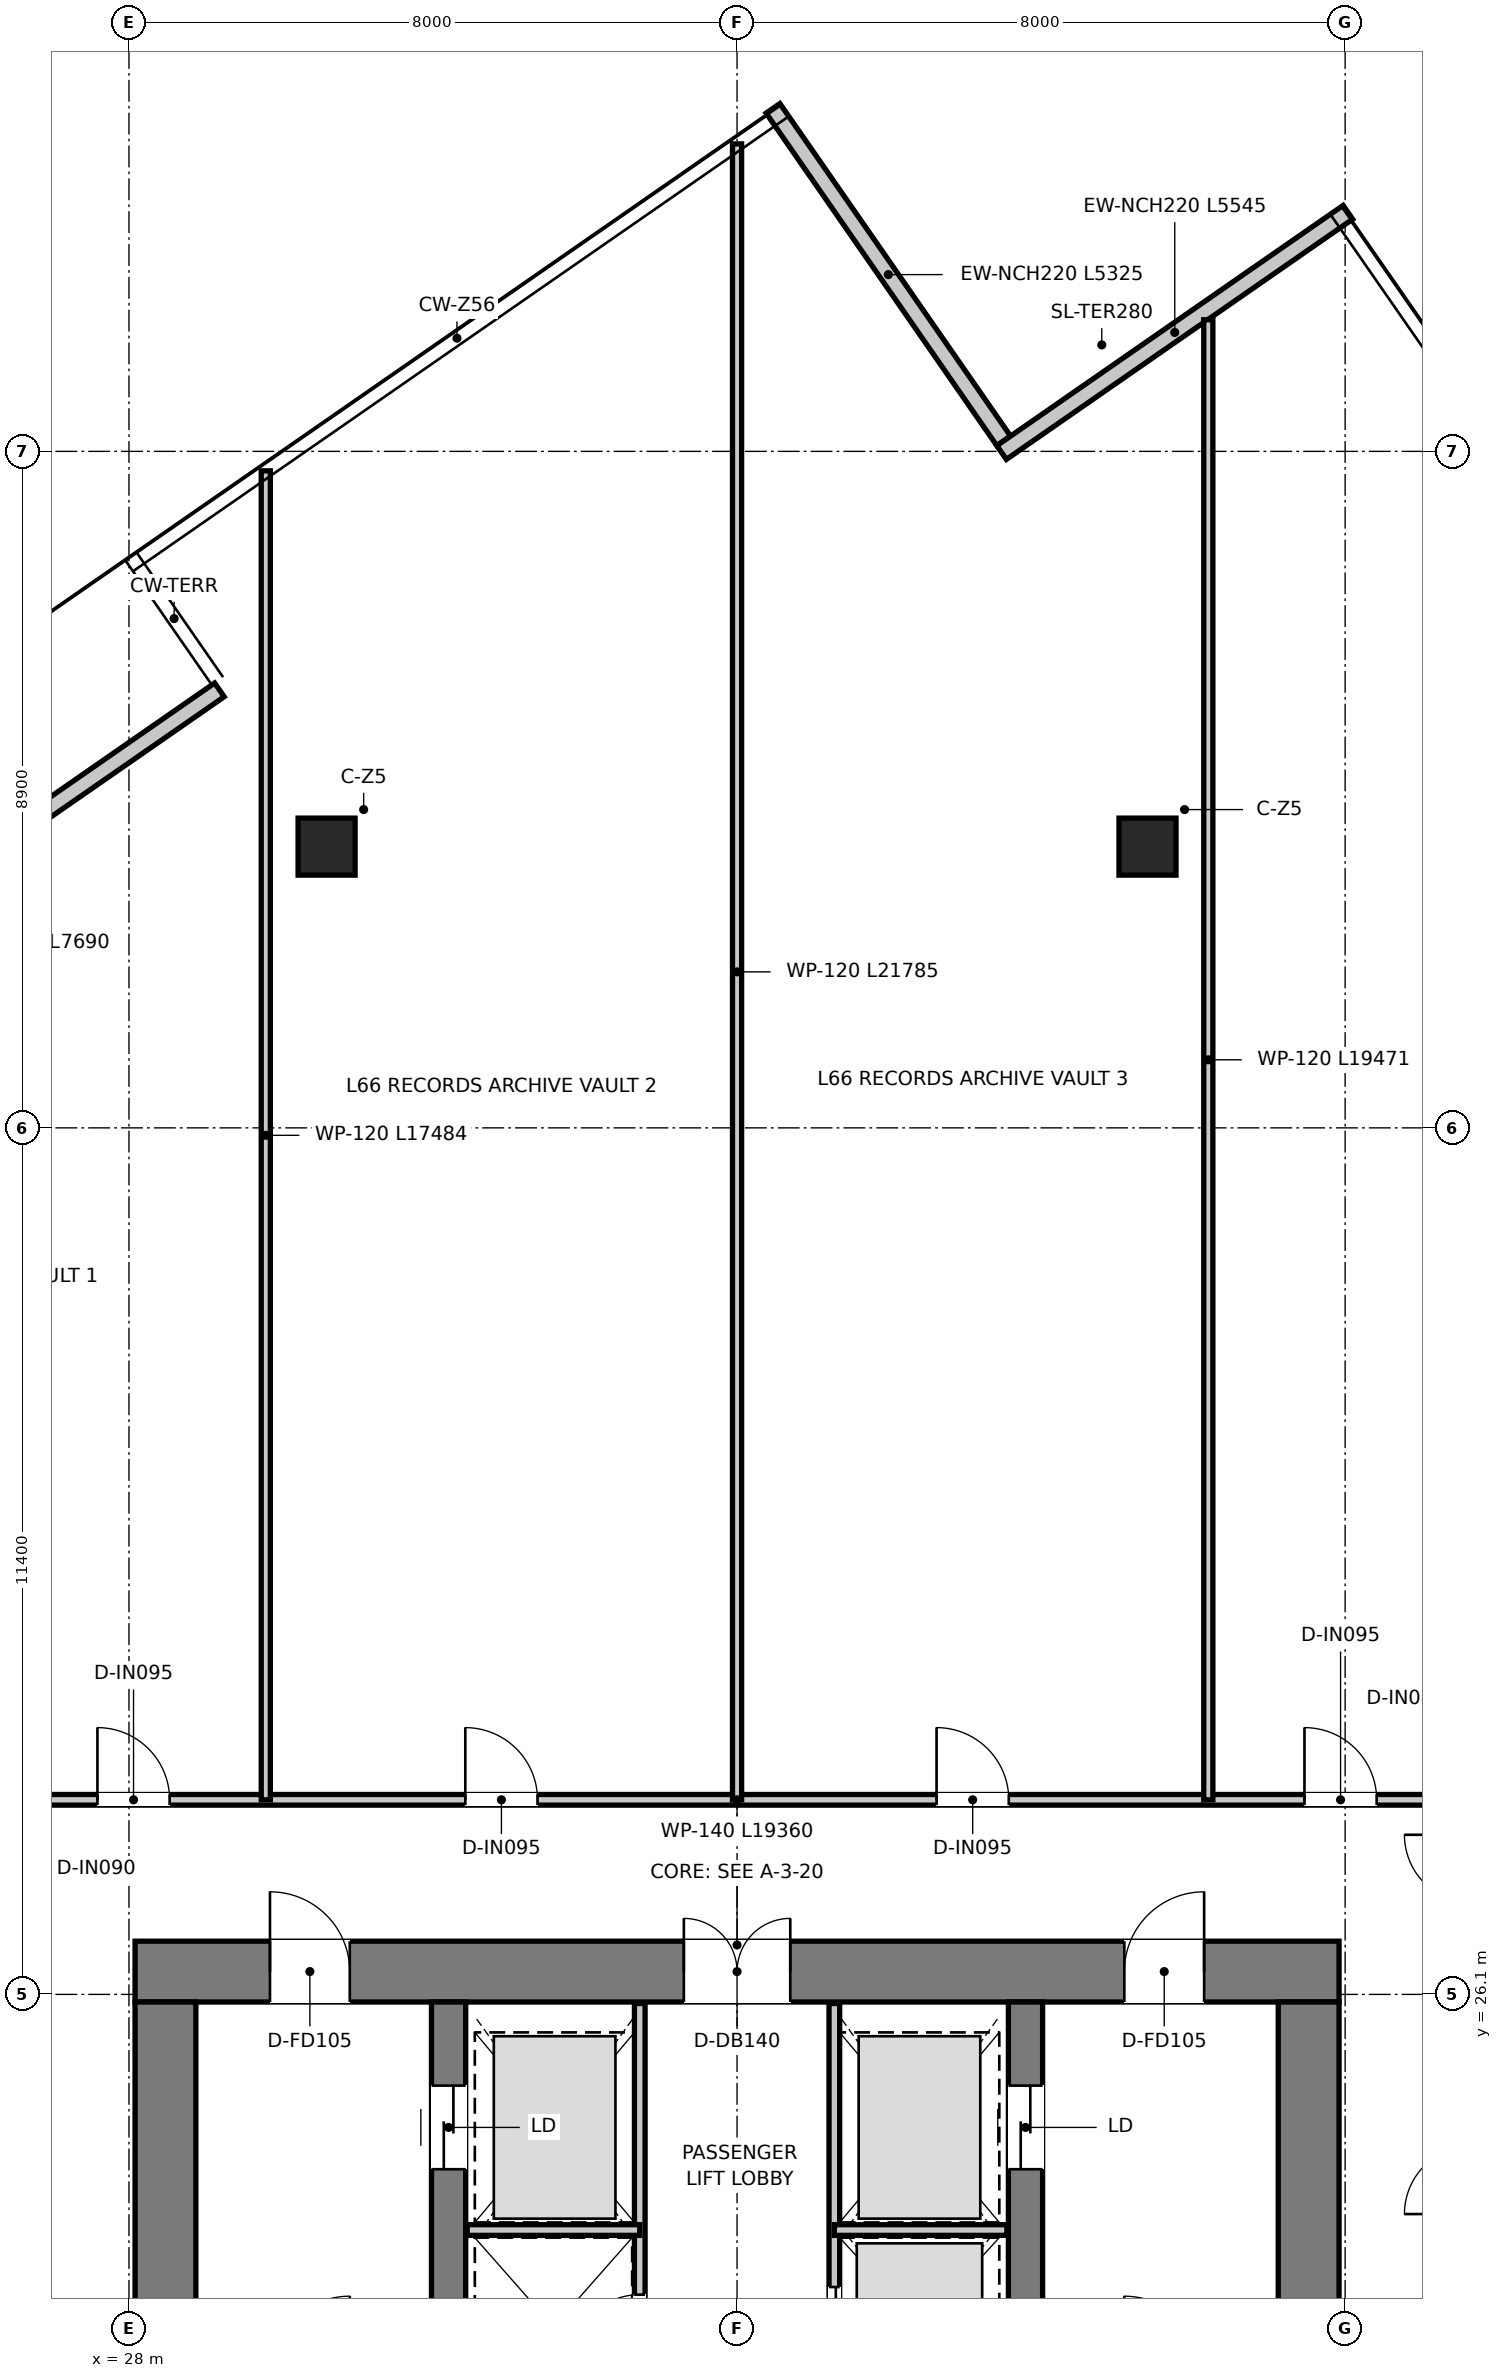
"""IFC4 building model, lengths in metres.
Left out: names, types, materials, properties, quantities, classifications, styles, units other than length and angle.
Written with IfcOpenShell. Run it as: python <this file> out.ifc"""

import sys

from ifc_helpers import new_model, si_unit, direction, frame, frame_2d, origin, origin_2d, place, context, subcontext, project, spatial, rectangle, extrude, source, transform, mapped, element, fill, save


model = new_model("IFC4")
c1 = context("Model", 3, precision=1e-05, world=origin(), true_north=direction((0.0, 1.0)))
c2 = subcontext(c1, "Body", "Model", "MODEL_VIEW")
j1 = project(units=[si_unit("LENGTHUNIT", "METRE"), si_unit("PLANEANGLEUNIT", "RADIAN")], contexts=[c1])
p1 = place(None, origin())
s1 = spatial("IfcSite", under=j1, at=p1, CompositionType="ELEMENT")
p2 = place(p1, origin())
s2 = spatial("IfcBuilding", under=s1, at=p2, CompositionType="ELEMENT")
p3 = place(p2, frame((0.0, 0.0, 271.35)))
s3 = spatial("IfcBuildingStorey", under=s2, at=p3, CompositionType="ELEMENT", Elevation=271.35)
p4 = place(p3, frame((28.08, 26.4, 0.0), z_axis=(0.0, 0.0, 1.0), x_axis=(1.0, 0.0, 0.0)))
e1 = element("IfcWall", 1, at=p4, inside=s3, PredefinedType="SHEAR", context=c2, shape_type="SweptSolid", body=[
    extrude(rectangle(XDim=15.84, YDim=0.8, at=frame_2d((7.92, 0.0))), origin(), (0.0, 0.0, 1.0), 3.95),
])
p5 = place(p4, frame((7.22, 0.0, 0.0)))
e2 = element("IfcOpeningElement", 2, at=p5, cuts=e1, PredefinedType="OPENING", context=c2, shape_type="SweptSolid", body=[
    extrude(rectangle(XDim=1.4, YDim=2.2, at=frame_2d((0.7, 1.1))), frame((0.0, 0.41, 0.0), z_axis=(0.0, -1.0, 0.0), x_axis=(1.0, 0.0, 0.0)), (0.0, 0.0, 1.0), 0.82),
])
p6 = place(p4, frame((1.775, 0.0, 0.0)))
e3 = element("IfcOpeningElement", 3, at=p6, cuts=e1, PredefinedType="OPENING", context=c2, shape_type="SweptSolid", body=[
    extrude(rectangle(XDim=1.05, YDim=2.1, at=frame_2d((0.525, 1.05))), frame((0.0, 0.41, 0.0), z_axis=(0.0, -1.0, 0.0), x_axis=(1.0, 0.0, 0.0)), (0.0, 0.0, 1.0), 0.82),
])
p7 = place(p4, frame((13.015, 0.0, 0.0)))
e4 = element("IfcOpeningElement", 4, at=p7, cuts=e1, PredefinedType="OPENING", context=c2, shape_type="SweptSolid", body=[
    extrude(rectangle(XDim=1.05, YDim=2.1, at=frame_2d((0.525, 1.05))), frame((0.0, 0.41, 0.0), z_axis=(0.0, -1.0, 0.0), x_axis=(1.0, 0.0, 0.0)), (0.0, 0.0, 1.0), 0.82),
])
for number, where, z_axis, x_axis in (
    (5, (28.48, 11.3, 0.0), (0.0, 0.0, 1.0), (0.0, 1.0, 0.0)),
    (6, (43.52, 11.3, 0.0), (0.0, 0.0, 1.0), (0.0, 1.0, 0.0)),
):
    element("IfcWall", number, at=place(p3, frame(where, z_axis=z_axis, x_axis=x_axis)), inside=s3, PredefinedType="SHEAR", context=c2, shape_type="SweptSolid", body=[
        extrude(rectangle(XDim=14.7, YDim=0.8, at=frame_2d((7.35, 0.0))), origin(), (0.0, 0.0, 1.0), 3.95),
    ])
p8 = place(p3, frame((32.205, 13.22, 0.0), z_axis=(0.0, 0.0, 1.0), x_axis=(0.0, 1.0, 0.0)))
e7 = element("IfcWall", 7, at=p8, inside=s3, PredefinedType="SHEAR", context=c2, shape_type="SweptSolid", body=[
    extrude(rectangle(XDim=12.78, YDim=0.45, at=frame_2d((6.39, 0.0))), origin(), (0.0, 0.0, 1.0), 3.95),
])
p9 = place(p8, frame((10.58, 0.0, 0.0)))
e8 = element("IfcOpeningElement", 8, at=p9, cuts=e7, PredefinedType="OPENING", context=c2, shape_type="SweptSolid", body=[
    extrude(rectangle(XDim=1.1, YDim=2.15, at=frame_2d((0.55, 1.075))), frame((0.0, 0.235, 0.0), z_axis=(0.0, -1.0, 0.0), x_axis=(1.0, 0.0, 0.0)), (0.0, 0.0, 1.0), 0.47),
])
p10 = place(p3, frame((39.795, 13.22, 0.0), z_axis=(0.0, 0.0, 1.0), x_axis=(0.0, 1.0, 0.0)))
e9 = element("IfcWall", 9, at=p10, inside=s3, PredefinedType="SHEAR", context=c2, shape_type="SweptSolid", body=[
    extrude(rectangle(XDim=12.78, YDim=0.45, at=frame_2d((6.39, 0.0))), origin(), (0.0, 0.0, 1.0), 3.95),
])
p11 = place(p10, frame((10.58, 0.0, 0.0)))
e10 = element("IfcOpeningElement", 10, at=p11, cuts=e9, PredefinedType="OPENING", context=c2, shape_type="SweptSolid", body=[
    extrude(rectangle(XDim=1.1, YDim=2.15, at=frame_2d((0.55, 1.075))), frame((0.0, 0.235, 0.0), z_axis=(0.0, -1.0, 0.0), x_axis=(1.0, 0.0, 0.0)), (0.0, 0.0, 1.0), 0.47),
])
m1 = source(origin(), c2, "Body", "SweptSolid", [
    extrude(rectangle(XDim=0.75, YDim=0.75, at=origin_2d()), origin(), (0.0, 0.0, 1.0), 3.95),
])
for number, where, z_axis, x_axis in (
    (11, (30.6, 41.2, 0.0), (0.0, 0.0, 1.0), (1.0, 0.0, 0.0)),
    (12, (41.4, 41.2, 0.0), (0.0, 0.0, 1.0), (1.0, 0.0, 0.0)),
):
    element("IfcColumn", number, at=place(p3, frame(where, z_axis=z_axis, x_axis=x_axis)), inside=s3, PredefinedType="COLUMN", context=c2, shape_type="MappedRepresentation", body=[
        mapped(m1, transform((0.0, 0.0, 0.0), x_axis=(1.0, 0.0, 0.0), y_axis=(0.0, 1.0, 0.0), z_axis=(0.0, 0.0, 1.0), scale=1.0)),
    ])
p12 = place(p3, frame((39.508, 46.538, 0.0), z_axis=(0.0, 0.0, 1.0), x_axis=(-0.570020283612, 0.821630620334, 0.0)))
e13 = element("IfcWall", 13, at=p12, inside=s3, PredefinedType="ELEMENTEDWALL", context=c2, shape_type="SweptSolid", body=[
    extrude(rectangle(XDim=5.325, YDim=0.22, at=frame_2d((2.663, 0.0))), origin(), (0.0, 0.0, 1.0), 3.67),
])
p13 = place(p3, frame((22.872, 38.879, 0.0), z_axis=(0.0, 0.0, 1.0), x_axis=(0.821640913491, 0.570005446709, 0.0)))
e14 = element("IfcWall", 14, at=p13, inside=s3, PredefinedType="ELEMENTEDWALL", context=c2, shape_type="SweptSolid", body=[
    extrude(rectangle(XDim=7.69, YDim=0.22, at=frame_2d((3.845, 0.0))), origin(), (0.0, 0.0, 1.0), 3.67),
])
p14 = place(p13, frame((3.857, 0.0, 0.0)))
e15 = element("IfcOpeningElement", 15, at=p14, cuts=e14, PredefinedType="OPENING", context=c2, shape_type="SweptSolid", body=[
    extrude(rectangle(XDim=0.95, YDim=2.1, at=frame_2d((0.475, 1.05))), frame((0.0, 0.12, 0.0), z_axis=(0.0, -1.0, 0.0), x_axis=(1.0, 0.0, 0.0)), (0.0, 0.0, 1.0), 0.24),
])
p15 = place(p3, frame((44.037, 49.545, 0.0), z_axis=(0.0, 0.0, 1.0), x_axis=(-0.821652918874, -0.569988141022, 0.0)))
e16 = element("IfcWall", 16, at=p15, inside=s3, PredefinedType="ELEMENTEDWALL", context=c2, shape_type="SweptSolid", body=[
    extrude(rectangle(XDim=5.545, YDim=0.22, at=frame_2d((2.772, 0.0))), origin(), (0.0, 0.0, 1.0), 3.67),
])
p16 = place(p3, frame((34.72, 20.2, 0.0), z_axis=(0.0, 0.0, 1.0), x_axis=(0.0, 1.0, 0.0)))
e17 = element("IfcWall", 17, at=p16, inside=s3, PredefinedType="PARTITIONING", context=c2, shape_type="SweptSolid", body=[
    extrude(rectangle(XDim=5.78, YDim=0.14, at=frame_2d((2.89, 0.0))), origin(), (0.0, 0.0, 1.0), 2.82),
])
p17 = place(p16, frame((1.05, 0.0, 0.0)))
e18 = element("IfcOpeningElement", 18, at=p17, cuts=e17, PredefinedType="OPENING", context=c2, shape_type="SweptSolid", body=[
    extrude(rectangle(XDim=0.9, YDim=2.1, at=frame_2d((0.45, 1.05))), frame((0.0, 0.08, 0.0), z_axis=(0.0, -1.0, 0.0), x_axis=(1.0, 0.0, 0.0)), (0.0, 0.0, 1.0), 0.16),
])
p18 = place(p3, frame((37.28, 20.2, 0.0), z_axis=(0.0, 0.0, 1.0), x_axis=(0.0, 1.0, 0.0)))
e19 = element("IfcWall", 19, at=p18, inside=s3, PredefinedType="PARTITIONING", context=c2, shape_type="SweptSolid", body=[
    extrude(rectangle(XDim=5.78, YDim=0.14, at=frame_2d((2.89, 0.0))), origin(), (0.0, 0.0, 1.0), 2.82),
])
p19 = place(p18, frame((0.95, 0.0, 0.0)))
e20 = element("IfcOpeningElement", 20, at=p19, cuts=e19, PredefinedType="OPENING", context=c2, shape_type="SweptSolid", body=[
    extrude(rectangle(XDim=1.1, YDim=2.15, at=frame_2d((0.55, 1.075))), frame((0.0, 0.08, 0.0), z_axis=(0.0, -1.0, 0.0), x_axis=(1.0, 0.0, 0.0)), (0.0, 0.0, 1.0), 0.16),
])
for number, where, z_axis, x_axis in (
    (21, (32.45, 23.0, 0.0), (0.0, 0.0, 1.0), (1.0, 0.0, 0.0)),
    (22, (37.28, 23.0, 0.0), (0.0, 0.0, 1.0), (1.0, 0.0, 0.0)),
):
    element("IfcWall", number, at=place(p3, frame(where, z_axis=z_axis, x_axis=x_axis)), inside=s3, PredefinedType="PARTITIONING", context=c2, shape_type="SweptSolid", body=[
        extrude(rectangle(XDim=2.27, YDim=0.14, at=frame_2d((1.135, 0.0))), origin(), (0.0, 0.0, 1.0), 2.82),
    ])
p20 = place(p3, frame((26.32, 28.66, 0.0), z_axis=(0.0, 0.0, 1.0), x_axis=(1.0, 0.0, 0.0)))
e23 = element("IfcWall", 23, at=p20, inside=s3, PredefinedType="PARTITIONING", context=c2, shape_type="SweptSolid", body=[
    extrude(rectangle(XDim=19.36, YDim=0.14, at=frame_2d((9.68, 0.0))), origin(), (0.0, 0.0, 1.0), 3.18),
])
p21 = place(p20, frame((1.265, 0.0, 0.0)))
e24 = element("IfcOpeningElement", 24, at=p21, cuts=e23, PredefinedType="OPENING", context=c2, shape_type="SweptSolid", body=[
    extrude(rectangle(XDim=0.95, YDim=2.1, at=frame_2d((0.475, 1.05))), frame((0.0, 0.08, 0.0), z_axis=(0.0, -1.0, 0.0), x_axis=(1.0, 0.0, 0.0)), (0.0, 0.0, 1.0), 0.16),
])
p22 = place(p20, frame((6.105, 0.0, 0.0)))
e25 = element("IfcOpeningElement", 25, at=p22, cuts=e23, PredefinedType="OPENING", context=c2, shape_type="SweptSolid", body=[
    extrude(rectangle(XDim=0.95, YDim=2.1, at=frame_2d((0.475, 1.05))), frame((0.0, 0.08, 0.0), z_axis=(0.0, -1.0, 0.0), x_axis=(1.0, 0.0, 0.0)), (0.0, 0.0, 1.0), 0.16),
])
p23 = place(p20, frame((12.305, 0.0, 0.0)))
e26 = element("IfcOpeningElement", 26, at=p23, cuts=e23, PredefinedType="OPENING", context=c2, shape_type="SweptSolid", body=[
    extrude(rectangle(XDim=0.95, YDim=2.1, at=frame_2d((0.475, 1.05))), frame((0.0, 0.08, 0.0), z_axis=(0.0, -1.0, 0.0), x_axis=(1.0, 0.0, 0.0)), (0.0, 0.0, 1.0), 0.16),
])
p24 = place(p20, frame((17.145, 0.0, 0.0)))
e27 = element("IfcOpeningElement", 27, at=p24, cuts=e23, PredefinedType="OPENING", context=c2, shape_type="SweptSolid", body=[
    extrude(rectangle(XDim=0.95, YDim=2.1, at=frame_2d((0.475, 1.05))), frame((0.0, 0.08, 0.0), z_axis=(0.0, -1.0, 0.0), x_axis=(1.0, 0.0, 0.0)), (0.0, 0.0, 1.0), 0.16),
])
p25 = place(p3, frame((29.8, 28.66, 0.0), z_axis=(0.0, 0.0, 1.0), x_axis=(0.0, 1.0, 0.0)))
e28 = element("IfcWall", 28, at=p25, inside=s3, PredefinedType="PARTITIONING", context=c2, shape_type="SweptSolid", body=[
    extrude(rectangle(XDim=17.484, YDim=0.12, at=frame_2d((8.742, 0.0))), origin(), (0.0, 0.0, 1.0), 3.13),
])
p26 = place(p3, frame((36.0, 28.66, 0.0), z_axis=(0.0, 0.0, 1.0), x_axis=(0.0, 1.0, 0.0)))
e29 = element("IfcWall", 29, at=p26, inside=s3, PredefinedType="PARTITIONING", context=c2, shape_type="SweptSolid", body=[
    extrude(rectangle(XDim=21.785, YDim=0.12, at=frame_2d((10.893, 0.0))), origin(), (0.0, 0.0, 1.0), 3.13),
])
p27 = place(p3, frame((42.2, 28.66, 0.0), z_axis=(0.0, 0.0, 1.0), x_axis=(0.0, 1.0, 0.0)))
e30 = element("IfcWall", 30, at=p27, inside=s3, PredefinedType="PARTITIONING", context=c2, shape_type="SweptSolid", body=[
    extrude(rectangle(XDim=19.471, YDim=0.12, at=frame_2d((9.736, 0.0))), origin(), (0.0, 0.0, 1.0), 3.13),
])
p28 = place(p5, origin())
e31 = element("IfcDoor", 31, at=p28, inside=s3, OperationType="DOUBLE_DOOR_SINGLE_SWING", PredefinedType="DOOR", context=c2, shape_type="SweptSolid", body=[
    extrude(rectangle(XDim=1.4, YDim=2.2, at=frame_2d((0.7, 1.1))), frame((0.0, 0.025, 0.0), z_axis=(0.0, -1.0, 0.0), x_axis=(1.0, 0.0, 0.0)), (0.0, 0.0, 1.0), 0.05),
])
fill(e2, e31)
p29 = place(p6, origin())
e32 = element("IfcDoor", 32, at=p29, inside=s3, OperationType="SINGLE_SWING_LEFT", PredefinedType="DOOR", context=c2, shape_type="SweptSolid", body=[
    extrude(rectangle(XDim=1.05, YDim=2.1, at=frame_2d((0.525, 1.05))), frame((0.0, 0.025, 0.0), z_axis=(0.0, -1.0, 0.0), x_axis=(1.0, 0.0, 0.0)), (0.0, 0.0, 1.0), 0.05),
])
fill(e3, e32)
p30 = place(p7, origin())
e33 = element("IfcDoor", 33, at=p30, inside=s3, OperationType="SINGLE_SWING_RIGHT", PredefinedType="DOOR", context=c2, shape_type="SweptSolid", body=[
    extrude(rectangle(XDim=1.05, YDim=2.1, at=frame_2d((0.525, 1.05))), frame((0.0, 0.025, 0.0), z_axis=(0.0, -1.0, 0.0), x_axis=(1.0, 0.0, 0.0)), (0.0, 0.0, 1.0), 0.05),
])
fill(e4, e33)
p31 = place(p9, origin())
e34 = element("IfcDoor", 34, at=p31, inside=s3, OperationType="DOUBLE_DOOR_SLIDING", PredefinedType="DOOR", context=c2, shape_type="SweptSolid", body=[
    extrude(rectangle(XDim=1.1, YDim=2.15, at=frame_2d((0.55, 1.075))), frame((0.0, 0.025, 0.0), z_axis=(0.0, -1.0, 0.0), x_axis=(1.0, 0.0, 0.0)), (0.0, 0.0, 1.0), 0.05),
])
fill(e8, e34)
p32 = place(p11, origin())
e35 = element("IfcDoor", 35, at=p32, inside=s3, OperationType="DOUBLE_DOOR_SLIDING", PredefinedType="DOOR", context=c2, shape_type="SweptSolid", body=[
    extrude(rectangle(XDim=1.1, YDim=2.15, at=frame_2d((0.55, 1.075))), frame((0.0, 0.025, 0.0), z_axis=(0.0, -1.0, 0.0), x_axis=(1.0, 0.0, 0.0)), (0.0, 0.0, 1.0), 0.05),
])
fill(e10, e35)
p33 = place(p17, origin())
e36 = element("IfcDoor", 36, at=p33, inside=s3, OperationType="SINGLE_SWING_LEFT", PredefinedType="DOOR", context=c2, shape_type="SweptSolid", body=[
    extrude(rectangle(XDim=0.9, YDim=2.1, at=frame_2d((0.45, 1.05))), frame((0.0, 0.025, 0.0), z_axis=(0.0, -1.0, 0.0), x_axis=(1.0, 0.0, 0.0)), (0.0, 0.0, 1.0), 0.05),
])
fill(e18, e36)
p34 = place(p19, origin())
e37 = element("IfcDoor", 37, at=p34, inside=s3, OperationType="DOUBLE_DOOR_SLIDING", PredefinedType="DOOR", context=c2, shape_type="SweptSolid", body=[
    extrude(rectangle(XDim=1.1, YDim=2.15, at=frame_2d((0.55, 1.075))), frame((0.0, 0.025, 0.0), z_axis=(0.0, -1.0, 0.0), x_axis=(1.0, 0.0, 0.0)), (0.0, 0.0, 1.0), 0.05),
])
fill(e20, e37)
p35 = place(p21, origin())
e38 = element("IfcDoor", 38, at=p35, inside=s3, OperationType="SINGLE_SWING_LEFT", PredefinedType="DOOR", context=c2, shape_type="SweptSolid", body=[
    extrude(rectangle(XDim=0.95, YDim=2.1, at=frame_2d((0.475, 1.05))), frame((0.0, 0.025, 0.0), z_axis=(0.0, -1.0, 0.0), x_axis=(1.0, 0.0, 0.0)), (0.0, 0.0, 1.0), 0.05),
])
fill(e24, e38)
p36 = place(p22, origin())
e39 = element("IfcDoor", 39, at=p36, inside=s3, OperationType="SINGLE_SWING_LEFT", PredefinedType="DOOR", context=c2, shape_type="SweptSolid", body=[
    extrude(rectangle(XDim=0.95, YDim=2.1, at=frame_2d((0.475, 1.05))), frame((0.0, 0.025, 0.0), z_axis=(0.0, -1.0, 0.0), x_axis=(1.0, 0.0, 0.0)), (0.0, 0.0, 1.0), 0.05),
])
fill(e25, e39)
p37 = place(p23, origin())
e40 = element("IfcDoor", 40, at=p37, inside=s3, OperationType="SINGLE_SWING_LEFT", PredefinedType="DOOR", context=c2, shape_type="SweptSolid", body=[
    extrude(rectangle(XDim=0.95, YDim=2.1, at=frame_2d((0.475, 1.05))), frame((0.0, 0.025, 0.0), z_axis=(0.0, -1.0, 0.0), x_axis=(1.0, 0.0, 0.0)), (0.0, 0.0, 1.0), 0.05),
])
fill(e26, e40)
p38 = place(p24, origin())
e41 = element("IfcDoor", 41, at=p38, inside=s3, OperationType="SINGLE_SWING_LEFT", PredefinedType="DOOR", context=c2, shape_type="SweptSolid", body=[
    extrude(rectangle(XDim=0.95, YDim=2.1, at=frame_2d((0.475, 1.05))), frame((0.0, 0.025, 0.0), z_axis=(0.0, -1.0, 0.0), x_axis=(1.0, 0.0, 0.0)), (0.0, 0.0, 1.0), 0.05),
])
fill(e27, e41)
save(model, sys.argv[1])
